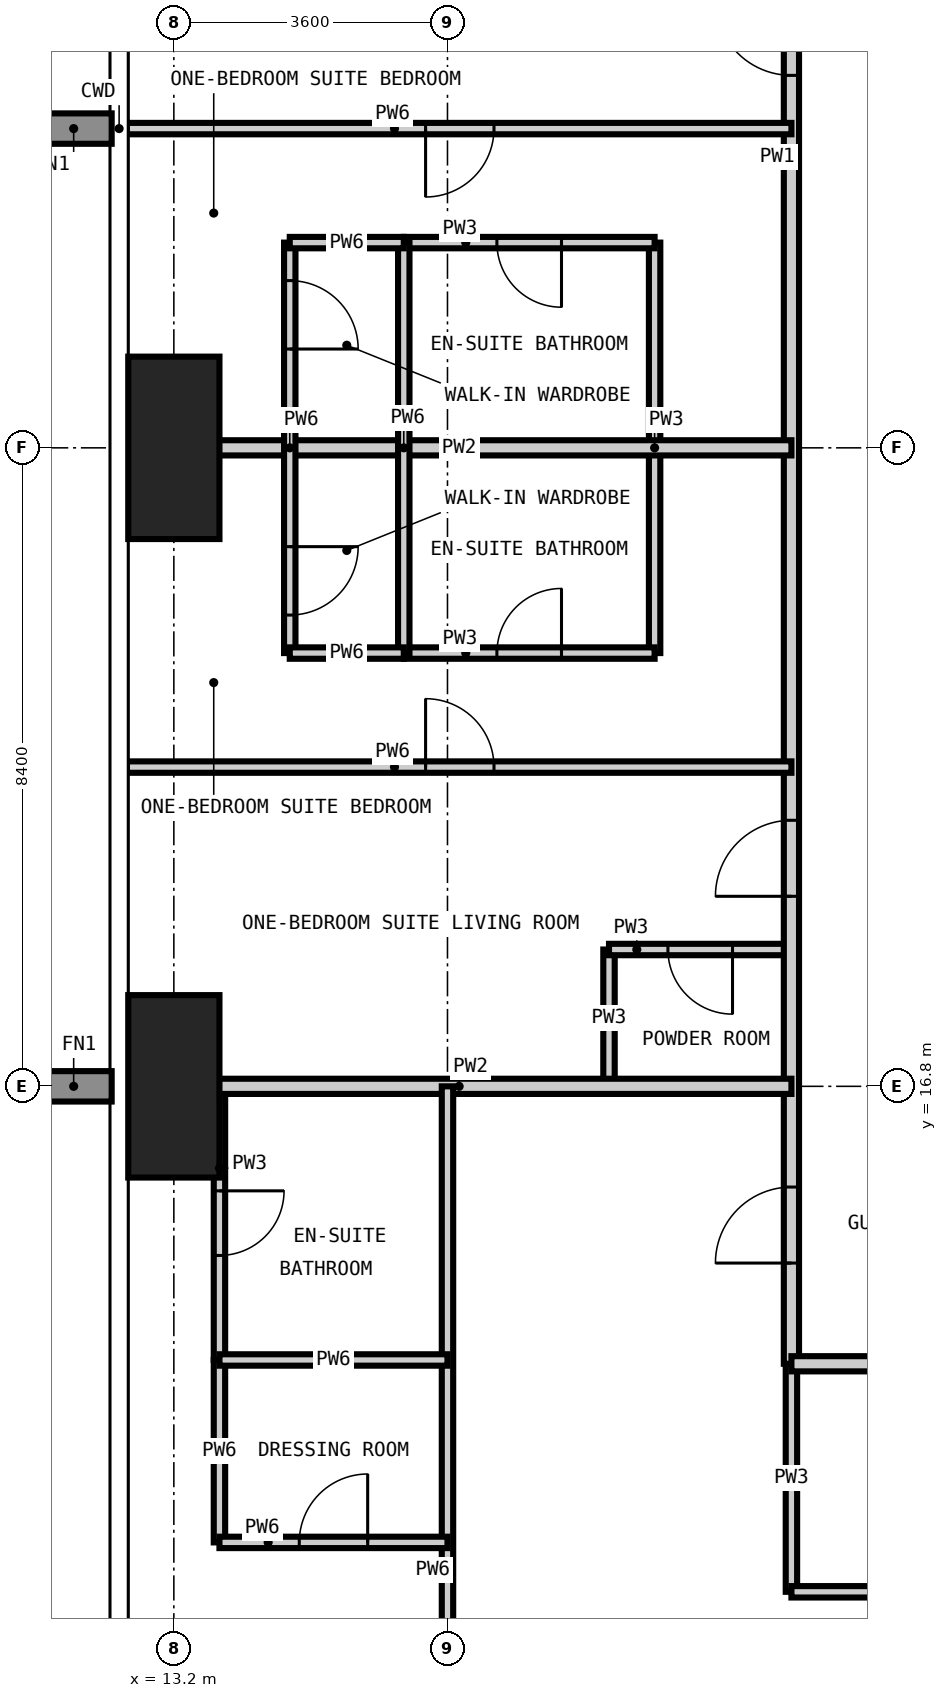
"""IFC4 building model, lengths in metres.
Left out: names, types, materials, properties, quantities, classifications, styles, units other than length and angle.
Written with IfcOpenShell. Run it as: python <this file> out.ifc"""

import sys

from ifc_helpers import new_model, si_unit, direction, frame, frame_2d, origin, origin_2d, place, context, subcontext, project, spatial, rectangle, extrude, element, fill, save


model = new_model("IFC4")
c1 = context("Model", 3, precision=1e-05, world=origin(), true_north=direction((0.0, 1.0)))
c2 = subcontext(c1, "Body", "Model", "MODEL_VIEW")
j1 = project(units=[si_unit("LENGTHUNIT", "METRE"), si_unit("PLANEANGLEUNIT", "RADIAN")], contexts=[c1])
p1 = place(None, origin())
s1 = spatial("IfcSite", under=j1, at=p1, CompositionType="ELEMENT")
p2 = place(p1, origin())
s2 = spatial("IfcBuilding", under=s1, at=p2, CompositionType="ELEMENT")
p3 = place(p2, frame((0.0, 0.0, 229.5)))
s3 = spatial("IfcBuildingStorey", under=s2, at=p3, CompositionType="ELEMENT", Elevation=229.5)
for number, where, z_axis, x_axis in (
    (1, (13.2, 16.8, -0.35), (0.0, 0.0, 1.0), (1.0, 0.0, 0.0)),
    (2, (13.2, 25.2, -0.35), (0.0, 0.0, 1.0), (1.0, 0.0, 0.0)),
):
    element("IfcColumn", number, at=place(p3, frame(where, z_axis=z_axis, x_axis=x_axis)), inside=s3, PredefinedType="COLUMN", context=c2, shape_type="SweptSolid", body=[
        extrude(rectangle(XDim=1.2, YDim=2.4, at=origin_2d()), origin(), (0.0, 0.0, 1.0), 3.9),
    ])
p4 = place(p3, frame((13.8, 13.2, 0.0), z_axis=(0.0, 0.0, 1.0), x_axis=(0.0, 1.0, 0.0)))
e3 = element("IfcWall", 3, at=p4, inside=s3, PredefinedType="PARTITIONING", context=c2, shape_type="SweptSolid", body=[
    extrude(rectangle(XDim=3.6, YDim=0.15, at=frame_2d((1.8, 0.0))), origin(), (0.0, 0.0, 1.0), 3.55),
])
p5 = place(p4, frame((1.375, 0.0, 0.0)))
e4 = element("IfcOpeningElement", 4, at=p5, cuts=e3, PredefinedType="OPENING", context=c2, shape_type="SweptSolid", body=[
    extrude(rectangle(XDim=0.85, YDim=2.1, at=frame_2d((0.425, 1.05))), frame((0.0, 0.085, 0.0), z_axis=(0.0, -1.0, 0.0), x_axis=(1.0, 0.0, 0.0)), (0.0, 0.0, 1.0), 0.17),
])
p6 = place(p3, frame((18.925, 16.8, 0.0), z_axis=(0.0, 0.0, 1.0), x_axis=(0.0, 1.0, 0.0)))
e5 = element("IfcWall", 5, at=p6, inside=s3, PredefinedType="PARTITIONING", context=c2, shape_type="SweptSolid", body=[
    extrude(rectangle(XDim=1.8, YDim=0.15, at=frame_2d((0.9, 0.0))), origin(), (0.0, 0.0, 1.0), 3.55),
])
p7 = place(p3, frame((19.525, 22.5, 0.0), z_axis=(0.0, 0.0, 1.0), x_axis=(0.0, 1.0, 0.0)))
e6 = element("IfcWall", 6, at=p7, inside=s3, PredefinedType="PARTITIONING", context=c2, shape_type="SweptSolid", body=[
    extrude(rectangle(XDim=5.4, YDim=0.15, at=frame_2d((2.7, 0.0))), origin(), (0.0, 0.0, 1.0), 3.55),
])
p8 = place(p3, frame((21.325, 10.15, 0.0), z_axis=(0.0, 0.0, 1.0), x_axis=(0.0, 1.0, 0.0)))
e7 = element("IfcWall", 7, at=p8, inside=s3, PredefinedType="PARTITIONING", context=c2, shape_type="SweptSolid", body=[
    extrude(rectangle(XDim=3.0, YDim=0.15, at=frame_2d((1.5, 0.0))), origin(), (0.0, 0.0, 1.0), 3.55),
])
p9 = place(p3, frame((21.325, 10.15, 0.0), z_axis=(0.0, 0.0, 1.0), x_axis=(1.0, 0.0, 0.0)))
e8 = element("IfcWall", 8, at=p9, inside=s3, PredefinedType="PARTITIONING", context=c2, shape_type="SweptSolid", body=[
    extrude(rectangle(XDim=3.875, YDim=0.15, at=frame_2d((1.938, 0.0))), origin(), (0.0, 0.0, 1.0), 3.55),
])
p10 = place(p9, frame((1.512, 0.0, 0.0)))
e9 = element("IfcOpeningElement", 9, at=p10, cuts=e8, PredefinedType="OPENING", context=c2, shape_type="SweptSolid", body=[
    extrude(rectangle(XDim=0.85, YDim=2.1, at=frame_2d((0.425, 1.05))), frame((0.0, 0.085, 0.0), z_axis=(0.0, -1.0, 0.0), x_axis=(1.0, 0.0, 0.0)), (0.0, 0.0, 1.0), 0.17),
])
p11 = place(p3, frame((18.925, 18.6, 0.0), z_axis=(0.0, 0.0, 1.0), x_axis=(1.0, 0.0, 0.0)))
e10 = element("IfcWall", 10, at=p11, inside=s3, PredefinedType="PARTITIONING", context=c2, shape_type="SweptSolid", body=[
    extrude(rectangle(XDim=2.4, YDim=0.15, at=frame_2d((1.2, 0.0))), origin(), (0.0, 0.0, 1.0), 3.55),
])
p12 = place(p11, frame((0.775, 0.0, 0.0)))
e11 = element("IfcOpeningElement", 11, at=p12, cuts=e10, PredefinedType="OPENING", context=c2, shape_type="SweptSolid", body=[
    extrude(rectangle(XDim=0.85, YDim=2.1, at=frame_2d((0.425, 1.05))), frame((0.0, 0.085, 0.0), z_axis=(0.0, -1.0, 0.0), x_axis=(1.0, 0.0, 0.0)), (0.0, 0.0, 1.0), 0.17),
])
p13 = place(p3, frame((16.225, 22.5, 0.0), z_axis=(0.0, 0.0, 1.0), x_axis=(1.0, 0.0, 0.0)))
e12 = element("IfcWall", 12, at=p13, inside=s3, PredefinedType="PARTITIONING", context=c2, shape_type="SweptSolid", body=[
    extrude(rectangle(XDim=3.3, YDim=0.15, at=frame_2d((1.65, 0.0))), origin(), (0.0, 0.0, 1.0), 3.55),
])
p14 = place(p13, frame((1.225, 0.0, 0.0)))
e13 = element("IfcOpeningElement", 13, at=p14, cuts=e12, PredefinedType="OPENING", context=c2, shape_type="SweptSolid", body=[
    extrude(rectangle(XDim=0.85, YDim=2.1, at=frame_2d((0.425, 1.05))), frame((0.0, 0.085, 0.0), z_axis=(0.0, -1.0, 0.0), x_axis=(1.0, 0.0, 0.0)), (0.0, 0.0, 1.0), 0.17),
])
p15 = place(p3, frame((16.225, 27.9, 0.0), z_axis=(0.0, 0.0, 1.0), x_axis=(1.0, 0.0, 0.0)))
e14 = element("IfcWall", 14, at=p15, inside=s3, PredefinedType="PARTITIONING", context=c2, shape_type="SweptSolid", body=[
    extrude(rectangle(XDim=3.3, YDim=0.15, at=frame_2d((1.65, 0.0))), origin(), (0.0, 0.0, 1.0), 3.55),
])
p16 = place(p15, frame((1.225, 0.0, 0.0)))
e15 = element("IfcOpeningElement", 15, at=p16, cuts=e14, PredefinedType="OPENING", context=c2, shape_type="SweptSolid", body=[
    extrude(rectangle(XDim=0.85, YDim=2.1, at=frame_2d((0.425, 1.05))), frame((0.0, 0.085, 0.0), z_axis=(0.0, -1.0, 0.0), x_axis=(1.0, 0.0, 0.0)), (0.0, 0.0, 1.0), 0.17),
])
p17 = place(p3, frame((21.325, 13.15, 0.0), z_axis=(0.0, 0.0, 1.0), x_axis=(0.0, 1.0, 0.0)))
e16 = element("IfcWall", 16, at=p17, inside=s3, PredefinedType="PARTITIONING", context=c2, shape_type="SweptSolid", body=[
    extrude(rectangle(XDim=31.9, YDim=0.2, at=frame_2d((15.95, 0.0))), origin(), (0.0, 0.0, 1.0), 3.55),
])
p18 = place(p17, frame((6.15, 0.0, 0.0)))
e17 = element("IfcOpeningElement", 17, at=p18, cuts=e16, PredefinedType="OPENING", context=c2, shape_type="SweptSolid", body=[
    extrude(rectangle(XDim=1.0, YDim=2.2, at=frame_2d((0.5, 1.1))), frame((0.0, 0.11, 0.0), z_axis=(0.0, -1.0, 0.0), x_axis=(1.0, 0.0, 0.0)), (0.0, 0.0, 1.0), 0.22),
])
p19 = place(p17, frame((16.95, 0.0, 0.0)))
e18 = element("IfcOpeningElement", 18, at=p19, cuts=e16, PredefinedType="OPENING", context=c2, shape_type="SweptSolid", body=[
    extrude(rectangle(XDim=1.0, YDim=2.2, at=frame_2d((0.5, 1.1))), frame((0.0, 0.11, 0.0), z_axis=(0.0, -1.0, 0.0), x_axis=(1.0, 0.0, 0.0)), (0.0, 0.0, 1.0), 0.22),
])
p20 = place(p17, frame((22.95, 0.0, 0.0)))
e19 = element("IfcOpeningElement", 19, at=p20, cuts=e16, PredefinedType="OPENING", context=c2, shape_type="SweptSolid", body=[
    extrude(rectangle(XDim=1.0, YDim=2.2, at=frame_2d((0.5, 1.1))), frame((0.0, 0.11, 0.0), z_axis=(0.0, -1.0, 0.0), x_axis=(1.0, 0.0, 0.0)), (0.0, 0.0, 1.0), 0.22),
])
p21 = place(p17, frame((1.325, 0.0, 0.0)))
e20 = element("IfcOpeningElement", 20, at=p21, cuts=e16, PredefinedType="OPENING", context=c2, shape_type="SweptSolid", body=[
    extrude(rectangle(XDim=1.0, YDim=2.2, at=frame_2d((0.5, 1.1))), frame((0.0, 0.11, 0.0), z_axis=(0.0, -1.0, 0.0), x_axis=(1.0, 0.0, 0.0)), (0.0, 0.0, 1.0), 0.22),
])
p22 = place(p17, frame((29.875, 0.0, 0.0)))
e21 = element("IfcOpeningElement", 21, at=p22, cuts=e16, PredefinedType="OPENING", context=c2, shape_type="SweptSolid", body=[
    extrude(rectangle(XDim=1.0, YDim=2.2, at=frame_2d((0.5, 1.1))), frame((0.0, 0.11, 0.0), z_axis=(0.0, -1.0, 0.0), x_axis=(1.0, 0.0, 0.0)), (0.0, 0.0, 1.0), 0.22),
])
p23 = place(p3, frame((44.45, 13.15, 0.0), z_axis=(0.0, 0.0, 1.0), x_axis=(-1.0, 0.0, 0.0)))
e22 = element("IfcWall", 22, at=p23, inside=s3, PredefinedType="PARTITIONING", context=c2, shape_type="SweptSolid", body=[
    extrude(rectangle(XDim=23.125, YDim=0.2, at=frame_2d((11.562, 0.0))), origin(), (0.0, 0.0, 1.0), 3.55),
])
p24 = place(p23, frame((14.55, 0.0, 0.0)))
e23 = element("IfcOpeningElement", 23, at=p24, cuts=e22, PredefinedType="OPENING", context=c2, shape_type="SweptSolid", body=[
    extrude(rectangle(XDim=1.0, YDim=2.2, at=frame_2d((0.5, 1.1))), frame((0.0, 0.11, 0.0), z_axis=(0.0, -1.0, 0.0), x_axis=(1.0, 0.0, 0.0)), (0.0, 0.0, 1.0), 0.22),
])
p25 = place(p23, frame((6.15, 0.0, 0.0)))
e24 = element("IfcOpeningElement", 24, at=p25, cuts=e22, PredefinedType="OPENING", context=c2, shape_type="SweptSolid", body=[
    extrude(rectangle(XDim=1.0, YDim=2.2, at=frame_2d((0.5, 1.1))), frame((0.0, 0.11, 0.0), z_axis=(0.0, -1.0, 0.0), x_axis=(1.0, 0.0, 0.0)), (0.0, 0.0, 1.0), 0.22),
])
for number, where, z_axis, x_axis in (
    (25, (12.582, 16.8, 0.0), (0.0, 0.0, 1.0), (1.0, 0.0, 0.0)),
    (26, (12.582, 25.2, 0.0), (0.0, 0.0, 1.0), (1.0, 0.0, 0.0)),
):
    element("IfcWall", number, at=place(p3, frame(where, z_axis=z_axis, x_axis=x_axis)), inside=s3, PredefinedType="PARTITIONING", context=c2, shape_type="SweptSolid", body=[
        extrude(rectangle(XDim=8.743, YDim=0.2, at=frame_2d((4.372, 0.0))), origin(), (0.0, 0.0, 1.0), 3.55),
    ])
p26 = place(p3, frame((13.8, 10.8, 0.0), z_axis=(0.0, 0.0, 1.0), x_axis=(0.0, 1.0, 0.0)))
e27 = element("IfcWall", 27, at=p26, inside=s3, PredefinedType="PARTITIONING", context=c2, shape_type="SweptSolid", body=[
    extrude(rectangle(XDim=2.4, YDim=0.15, at=frame_2d((1.2, 0.0))), origin(), (0.0, 0.0, 1.0), 3.55),
])
p27 = place(p3, frame((14.725, 22.5, 0.0), z_axis=(0.0, 0.0, 1.0), x_axis=(0.0, 1.0, 0.0)))
e28 = element("IfcWall", 28, at=p27, inside=s3, PredefinedType="PARTITIONING", context=c2, shape_type="SweptSolid", body=[
    extrude(rectangle(XDim=5.4, YDim=0.15, at=frame_2d((2.7, 0.0))), origin(), (0.0, 0.0, 1.0), 3.55),
])
p28 = place(p27, frame((0.5, 0.0, 0.0)))
e29 = element("IfcOpeningElement", 29, at=p28, cuts=e28, PredefinedType="OPENING", context=c2, shape_type="SweptSolid", body=[
    extrude(rectangle(XDim=0.9, YDim=2.1, at=frame_2d((0.45, 1.05))), frame((0.0, 0.085, 0.0), z_axis=(0.0, -1.0, 0.0), x_axis=(1.0, 0.0, 0.0)), (0.0, 0.0, 1.0), 0.17),
])
p29 = place(p27, frame((4.0, 0.0, 0.0)))
e30 = element("IfcOpeningElement", 30, at=p29, cuts=e28, PredefinedType="OPENING", context=c2, shape_type="SweptSolid", body=[
    extrude(rectangle(XDim=0.9, YDim=2.1, at=frame_2d((0.45, 1.05))), frame((0.0, 0.085, 0.0), z_axis=(0.0, -1.0, 0.0), x_axis=(1.0, 0.0, 0.0)), (0.0, 0.0, 1.0), 0.17),
])
p30 = place(p3, frame((16.225, 22.5, 0.0), z_axis=(0.0, 0.0, 1.0), x_axis=(0.0, 1.0, 0.0)))
e31 = element("IfcWall", 31, at=p30, inside=s3, PredefinedType="PARTITIONING", context=c2, shape_type="SweptSolid", body=[
    extrude(rectangle(XDim=5.4, YDim=0.15, at=frame_2d((2.7, 0.0))), origin(), (0.0, 0.0, 1.0), 3.55),
])
p31 = place(p3, frame((16.8, 4.182, 0.0), z_axis=(0.0, 0.0, 1.0), x_axis=(0.0, 1.0, 0.0)))
e32 = element("IfcWall", 32, at=p31, inside=s3, PredefinedType="PARTITIONING", context=c2, shape_type="SweptSolid", body=[
    extrude(rectangle(XDim=12.618, YDim=0.15, at=frame_2d((6.309, 0.0))), origin(), (0.0, 0.0, 1.0), 3.55),
])
p32 = place(p31, frame((2.868, 0.0, 0.0)))
e33 = element("IfcOpeningElement", 33, at=p32, cuts=e32, PredefinedType="OPENING", context=c2, shape_type="SweptSolid", body=[
    extrude(rectangle(XDim=0.9, YDim=2.1, at=frame_2d((0.45, 1.05))), frame((0.0, 0.085, 0.0), z_axis=(0.0, -1.0, 0.0), x_axis=(1.0, 0.0, 0.0)), (0.0, 0.0, 1.0), 0.17),
])
p33 = place(p3, frame((13.8, 10.8, 0.0), z_axis=(0.0, 0.0, 1.0), x_axis=(1.0, 0.0, 0.0)))
e34 = element("IfcWall", 34, at=p33, inside=s3, PredefinedType="PARTITIONING", context=c2, shape_type="SweptSolid", body=[
    extrude(rectangle(XDim=3.0, YDim=0.15, at=frame_2d((1.5, 0.0))), origin(), (0.0, 0.0, 1.0), 3.55),
])
p34 = place(p33, frame((1.05, 0.0, 0.0)))
e35 = element("IfcOpeningElement", 35, at=p34, cuts=e34, PredefinedType="OPENING", context=c2, shape_type="SweptSolid", body=[
    extrude(rectangle(XDim=0.9, YDim=2.1, at=frame_2d((0.45, 1.05))), frame((0.0, 0.085, 0.0), z_axis=(0.0, -1.0, 0.0), x_axis=(1.0, 0.0, 0.0)), (0.0, 0.0, 1.0), 0.17),
])
p35 = place(p3, frame((13.8, 13.2, 0.0), z_axis=(0.0, 0.0, 1.0), x_axis=(1.0, 0.0, 0.0)))
e36 = element("IfcWall", 36, at=p35, inside=s3, PredefinedType="PARTITIONING", context=c2, shape_type="SweptSolid", body=[
    extrude(rectangle(XDim=3.0, YDim=0.15, at=frame_2d((1.5, 0.0))), origin(), (0.0, 0.0, 1.0), 3.55),
])
p36 = place(p3, frame((12.582, 21.0, 0.0), z_axis=(0.0, 0.0, 1.0), x_axis=(1.0, 0.0, 0.0)))
e37 = element("IfcWall", 37, at=p36, inside=s3, PredefinedType="PARTITIONING", context=c2, shape_type="SweptSolid", body=[
    extrude(rectangle(XDim=8.743, YDim=0.15, at=frame_2d((4.372, 0.0))), origin(), (0.0, 0.0, 1.0), 3.55),
])
p37 = place(p36, frame((3.93, 0.0, 0.0)))
e38 = element("IfcOpeningElement", 38, at=p37, cuts=e37, PredefinedType="OPENING", context=c2, shape_type="SweptSolid", body=[
    extrude(rectangle(XDim=0.9, YDim=2.1, at=frame_2d((0.45, 1.05))), frame((0.0, 0.085, 0.0), z_axis=(0.0, -1.0, 0.0), x_axis=(1.0, 0.0, 0.0)), (0.0, 0.0, 1.0), 0.17),
])
for number, where, z_axis, x_axis in (
    (39, (14.725, 22.5, 0.0), (0.0, 0.0, 1.0), (1.0, 0.0, 0.0)),
    (40, (14.725, 27.9, 0.0), (0.0, 0.0, 1.0), (1.0, 0.0, 0.0)),
):
    element("IfcWall", number, at=place(p3, frame(where, z_axis=z_axis, x_axis=x_axis)), inside=s3, PredefinedType="PARTITIONING", context=c2, shape_type="SweptSolid", body=[
        extrude(rectangle(XDim=1.5, YDim=0.15, at=frame_2d((0.75, 0.0))), origin(), (0.0, 0.0, 1.0), 3.55),
    ])
p38 = place(p3, frame((12.582, 29.4, 0.0), z_axis=(0.0, 0.0, 1.0), x_axis=(1.0, 0.0, 0.0)))
e41 = element("IfcWall", 41, at=p38, inside=s3, PredefinedType="PARTITIONING", context=c2, shape_type="SweptSolid", body=[
    extrude(rectangle(XDim=8.743, YDim=0.15, at=frame_2d((4.372, 0.0))), origin(), (0.0, 0.0, 1.0), 3.55),
])
p39 = place(p38, frame((3.93, 0.0, 0.0)))
e42 = element("IfcOpeningElement", 42, at=p39, cuts=e41, PredefinedType="OPENING", context=c2, shape_type="SweptSolid", body=[
    extrude(rectangle(XDim=0.9, YDim=2.1, at=frame_2d((0.45, 1.05))), frame((0.0, 0.085, 0.0), z_axis=(0.0, -1.0, 0.0), x_axis=(1.0, 0.0, 0.0)), (0.0, 0.0, 1.0), 0.17),
])
p40 = place(p18, origin())
e43 = element("IfcDoor", 43, at=p40, inside=s3, OperationType="SINGLE_SWING_LEFT", PredefinedType="DOOR", context=c2, shape_type="SweptSolid", body=[
    extrude(rectangle(XDim=1.0, YDim=2.2, at=frame_2d((0.5, 1.1))), frame((0.0, 0.025, 0.0), z_axis=(0.0, -1.0, 0.0), x_axis=(1.0, 0.0, 0.0)), (0.0, 0.0, 1.0), 0.05),
])
fill(e17, e43)
p41 = place(p12, frame((0.85, 0.0, 0.0), z_axis=(0.0, 0.0, 1.0), x_axis=(-1.0, 0.0, 0.0)))
e44 = element("IfcDoor", 44, at=p41, inside=s3, OperationType="SINGLE_SWING_LEFT", PredefinedType="DOOR", context=c2, shape_type="SweptSolid", body=[
    extrude(rectangle(XDim=0.85, YDim=2.1, at=frame_2d((0.425, 1.05))), frame((0.0, 0.025, 0.0), z_axis=(0.0, -1.0, 0.0), x_axis=(1.0, 0.0, 0.0)), (0.0, 0.0, 1.0), 0.05),
])
fill(e11, e44)
p42 = place(p37, origin())
e45 = element("IfcDoor", 45, at=p42, inside=s3, OperationType="SINGLE_SWING_LEFT", PredefinedType="DOOR", context=c2, shape_type="SweptSolid", body=[
    extrude(rectangle(XDim=0.9, YDim=2.1, at=frame_2d((0.45, 1.05))), frame((0.0, 0.025, 0.0), z_axis=(0.0, -1.0, 0.0), x_axis=(1.0, 0.0, 0.0)), (0.0, 0.0, 1.0), 0.05),
])
fill(e38, e45)
p43 = place(p14, origin())
e46 = element("IfcDoor", 46, at=p43, inside=s3, OperationType="SINGLE_SWING_RIGHT", PredefinedType="DOOR", context=c2, shape_type="SweptSolid", body=[
    extrude(rectangle(XDim=0.85, YDim=2.1, at=frame_2d((0.425, 1.05))), frame((0.0, 0.025, 0.0), z_axis=(0.0, -1.0, 0.0), x_axis=(1.0, 0.0, 0.0)), (0.0, 0.0, 1.0), 0.05),
])
fill(e13, e46)
p44 = place(p28, frame((0.9, 0.0, 0.0), z_axis=(0.0, 0.0, 1.0), x_axis=(-1.0, 0.0, 0.0)))
e47 = element("IfcDoor", 47, at=p44, inside=s3, OperationType="SINGLE_SWING_LEFT", PredefinedType="DOOR", context=c2, shape_type="SweptSolid", body=[
    extrude(rectangle(XDim=0.9, YDim=2.1, at=frame_2d((0.45, 1.05))), frame((0.0, 0.025, 0.0), z_axis=(0.0, -1.0, 0.0), x_axis=(1.0, 0.0, 0.0)), (0.0, 0.0, 1.0), 0.05),
])
fill(e29, e47)
p45 = place(p19, origin())
e48 = element("IfcDoor", 48, at=p45, inside=s3, OperationType="SINGLE_SWING_RIGHT", PredefinedType="DOOR", context=c2, shape_type="SweptSolid", body=[
    extrude(rectangle(XDim=1.0, YDim=2.2, at=frame_2d((0.5, 1.1))), frame((0.0, 0.025, 0.0), z_axis=(0.0, -1.0, 0.0), x_axis=(1.0, 0.0, 0.0)), (0.0, 0.0, 1.0), 0.05),
])
fill(e18, e48)
p46 = place(p39, frame((0.9, 0.0, 0.0), z_axis=(0.0, 0.0, 1.0), x_axis=(-1.0, 0.0, 0.0)))
e49 = element("IfcDoor", 49, at=p46, inside=s3, OperationType="SINGLE_SWING_RIGHT", PredefinedType="DOOR", context=c2, shape_type="SweptSolid", body=[
    extrude(rectangle(XDim=0.9, YDim=2.1, at=frame_2d((0.45, 1.05))), frame((0.0, 0.025, 0.0), z_axis=(0.0, -1.0, 0.0), x_axis=(1.0, 0.0, 0.0)), (0.0, 0.0, 1.0), 0.05),
])
fill(e42, e49)
p47 = place(p16, frame((0.85, 0.0, 0.0), z_axis=(0.0, 0.0, 1.0), x_axis=(-1.0, 0.0, 0.0)))
e50 = element("IfcDoor", 50, at=p47, inside=s3, OperationType="SINGLE_SWING_LEFT", PredefinedType="DOOR", context=c2, shape_type="SweptSolid", body=[
    extrude(rectangle(XDim=0.85, YDim=2.1, at=frame_2d((0.425, 1.05))), frame((0.0, 0.025, 0.0), z_axis=(0.0, -1.0, 0.0), x_axis=(1.0, 0.0, 0.0)), (0.0, 0.0, 1.0), 0.05),
])
fill(e15, e50)
p48 = place(p29, frame((0.9, 0.0, 0.0), z_axis=(0.0, 0.0, 1.0), x_axis=(-1.0, 0.0, 0.0)))
e51 = element("IfcDoor", 51, at=p48, inside=s3, OperationType="SINGLE_SWING_RIGHT", PredefinedType="DOOR", context=c2, shape_type="SweptSolid", body=[
    extrude(rectangle(XDim=0.9, YDim=2.1, at=frame_2d((0.45, 1.05))), frame((0.0, 0.025, 0.0), z_axis=(0.0, -1.0, 0.0), x_axis=(1.0, 0.0, 0.0)), (0.0, 0.0, 1.0), 0.05),
])
fill(e30, e51)
p49 = place(p21, origin())
e52 = element("IfcDoor", 52, at=p49, inside=s3, OperationType="SINGLE_SWING_LEFT", PredefinedType="DOOR", context=c2, shape_type="SweptSolid", body=[
    extrude(rectangle(XDim=1.0, YDim=2.2, at=frame_2d((0.5, 1.1))), frame((0.0, 0.025, 0.0), z_axis=(0.0, -1.0, 0.0), x_axis=(1.0, 0.0, 0.0)), (0.0, 0.0, 1.0), 0.05),
])
fill(e20, e52)
p50 = place(p5, frame((0.85, 0.0, 0.0), z_axis=(0.0, 0.0, 1.0), x_axis=(-1.0, 0.0, 0.0)))
e53 = element("IfcDoor", 53, at=p50, inside=s3, OperationType="SINGLE_SWING_LEFT", PredefinedType="DOOR", context=c2, shape_type="SweptSolid", body=[
    extrude(rectangle(XDim=0.85, YDim=2.1, at=frame_2d((0.425, 1.05))), frame((0.0, 0.025, 0.0), z_axis=(0.0, -1.0, 0.0), x_axis=(1.0, 0.0, 0.0)), (0.0, 0.0, 1.0), 0.05),
])
fill(e4, e53)
p51 = place(p34, origin())
e54 = element("IfcDoor", 54, at=p51, inside=s3, OperationType="SINGLE_SWING_RIGHT", PredefinedType="DOOR", context=c2, shape_type="SweptSolid", body=[
    extrude(rectangle(XDim=0.9, YDim=2.1, at=frame_2d((0.45, 1.05))), frame((0.0, 0.025, 0.0), z_axis=(0.0, -1.0, 0.0), x_axis=(1.0, 0.0, 0.0)), (0.0, 0.0, 1.0), 0.05),
])
fill(e35, e54)
save(model, sys.argv[1])
